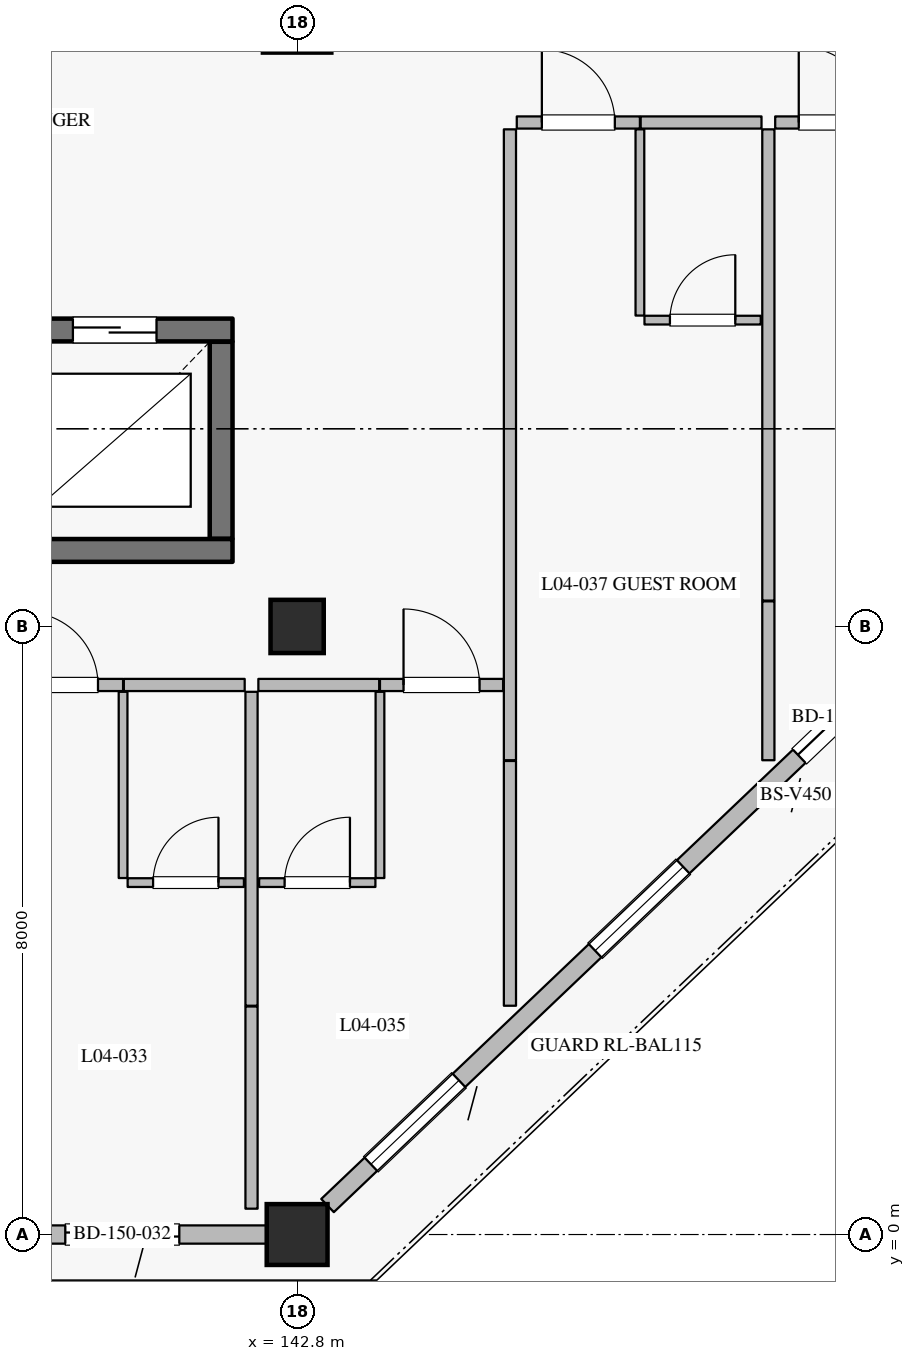
"""IFC4 building model, lengths in metres.
Left out: names, types, materials, properties, quantities, classifications, styles, units other than length and angle.
Written with IfcOpenShell. Run it as: python <this file> out.ifc"""

import sys

from ifc_helpers import new_model, si_unit, direction, frame, frame_2d, origin, origin_2d, place, context, subcontext, project, spatial, rectangle, extrude, element, fill, save


model = new_model("IFC4")
c1 = context("Model", 3, precision=1e-05, world=origin(), true_north=direction((0.0, 1.0)))
c2 = subcontext(c1, "Body", "Model", "MODEL_VIEW")
j1 = project(units=[si_unit("LENGTHUNIT", "METRE"), si_unit("PLANEANGLEUNIT", "RADIAN")], contexts=[c1])
p1 = place(None, origin())
s1 = spatial("IfcSite", under=j1, at=p1, CompositionType="ELEMENT")
p2 = place(p1, origin())
s2 = spatial("IfcBuilding", under=s1, at=p2, CompositionType="ELEMENT")
p3 = place(p2, frame((0.0, 0.0, 21.0)))
s3 = spatial("IfcBuildingStorey", under=s2, at=p3, CompositionType="ELEMENT", Elevation=21.0)
p4 = place(p3, frame((142.8, 0.0, 0.0), z_axis=(0.0, 0.0, 1.0), x_axis=(1.0, 0.0, 0.0)))
e1 = element("IfcColumn", 1, at=p4, inside=s3, PredefinedType="COLUMN", context=c2, shape_type="SweptSolid", body=[
    extrude(rectangle(XDim=0.8, YDim=0.8, at=origin_2d()), origin(), (0.0, 0.0, 1.0), 4.2),
])
p5 = place(p3, frame((142.8, 8.0, 0.0), z_axis=(0.0, 0.0, 1.0), x_axis=(1.0, 0.0, 0.0)))
e2 = element("IfcColumn", 2, at=p5, inside=s3, PredefinedType="COLUMN", context=c2, shape_type="SweptSolid", body=[
    extrude(rectangle(XDim=0.7, YDim=0.7, at=origin_2d()), origin(), (0.0, 0.0, 1.0), 4.2),
])
p6 = place(p3, frame((142.4, 0.0, 0.0), z_axis=(0.0, 0.0, 1.0), x_axis=(-1.0, 0.0, 0.0)))
e3 = element("IfcWall", 3, at=p6, inside=s3, PredefinedType="SOLIDWALL", context=c2, shape_type="SweptSolid", body=[
    extrude(rectangle(XDim=7.6, YDim=0.24, at=frame_2d((3.8, 0.0))), origin(), (0.0, 0.0, 1.0), 3.53),
])
p7 = place(p6, frame((1.15, 0.0, 0.0)))
e4 = element("IfcOpeningElement", 4, at=p7, cuts=e3, PredefinedType="OPENING", context=c2, shape_type="SweptSolid", body=[
    extrude(rectangle(XDim=1.5, YDim=2.25, at=frame_2d((0.75, 1.125))), frame((0.0, 0.13, 0.0), z_axis=(0.0, -1.0, 0.0), x_axis=(1.0, 0.0, 0.0)), (0.0, 0.0, 1.0), 0.26),
])
p8 = place(p6, frame((4.5, 0.0, 0.8)))
e5 = element("IfcOpeningElement", 5, at=p8, cuts=e3, PredefinedType="OPENING", context=c2, shape_type="SweptSolid", body=[
    extrude(rectangle(XDim=1.6, YDim=1.6, at=frame_2d((0.8, 0.8))), frame((0.0, 0.13, 0.0), z_axis=(0.0, -1.0, 0.0), x_axis=(1.0, 0.0, 0.0)), (0.0, 0.0, 1.0), 0.26),
])
p9 = place(p3, frame((150.8, 7.619, 0.0), z_axis=(0.0, 0.0, 1.0), x_axis=(-0.724156739794, -0.689635422677, 0.0)))
e6 = element("IfcWall", 6, at=p9, inside=s3, PredefinedType="SOLIDWALL", context=c2, shape_type="SweptSolid", body=[
    extrude(rectangle(XDim=10.495, YDim=0.24, at=frame_2d((5.248, 0.0))), origin(), (0.0, 0.0, 1.0), 3.53),
])
p10 = place(p9, frame((0.424, 0.0, 0.0)))
e7 = element("IfcOpeningElement", 7, at=p10, cuts=e6, PredefinedType="OPENING", context=c2, shape_type="SweptSolid", body=[
    extrude(rectangle(XDim=1.5, YDim=2.25, at=frame_2d((0.75, 1.125))), frame((0.0, 0.13, 0.0), z_axis=(0.0, -1.0, 0.0), x_axis=(1.0, 0.0, 0.0)), (0.0, 0.0, 1.0), 0.26),
])
p11 = place(p9, frame((4.033, 0.0, 0.8)))
e8 = element("IfcOpeningElement", 8, at=p11, cuts=e6, PredefinedType="OPENING", context=c2, shape_type="SweptSolid", body=[
    extrude(rectangle(XDim=1.6, YDim=1.6, at=frame_2d((0.8, 0.8))), frame((0.0, 0.13, 0.0), z_axis=(0.0, -1.0, 0.0), x_axis=(1.0, 0.0, 0.0)), (0.0, 0.0, 1.0), 0.26),
])
p12 = place(p9, frame((8.107, 0.0, 0.8)))
e9 = element("IfcOpeningElement", 9, at=p12, cuts=e6, PredefinedType="OPENING", context=c2, shape_type="SweptSolid", body=[
    extrude(rectangle(XDim=1.6, YDim=1.6, at=frame_2d((0.8, 0.8))), frame((0.0, 0.13, 0.0), z_axis=(0.0, -1.0, 0.0), x_axis=(1.0, 0.0, 0.0)), (0.0, 0.0, 1.0), 0.26),
])
p13 = place(p3, frame((138.85, 9.0, 0.0), z_axis=(0.0, 0.0, 1.0), x_axis=(1.0, 0.0, 0.0)))
e10 = element("IfcWall", 10, at=p13, inside=s3, PredefinedType="SHEAR", context=c2, shape_type="SweptSolid", body=[
    extrude(rectangle(XDim=3.1, YDim=0.3, at=frame_2d((1.55, 0.0))), origin(), (0.0, 0.0, 1.0), 3.965),
])
p14 = place(p3, frame((141.8, 9.155, 0.0), z_axis=(0.0, 0.0, 1.0), x_axis=(0.0, 1.0, 0.0)))
e11 = element("IfcWall", 11, at=p14, inside=s3, PredefinedType="SHEAR", context=c2, shape_type="SweptSolid", body=[
    extrude(rectangle(XDim=2.59, YDim=0.3, at=frame_2d((1.295, 0.0))), origin(), (0.0, 0.0, 1.0), 3.965),
])
p15 = place(p3, frame((141.95, 11.9, 0.0), z_axis=(0.0, 0.0, 1.0), x_axis=(-1.0, 0.0, 0.0)))
e12 = element("IfcWall", 12, at=p15, inside=s3, PredefinedType="SHEAR", context=c2, shape_type="SweptSolid", body=[
    extrude(rectangle(XDim=3.1, YDim=0.3, at=frame_2d((1.55, 0.0))), origin(), (0.0, 0.0, 1.0), 3.965),
])
p16 = place(p15, frame((1.0, 0.0, 0.0)))
e13 = element("IfcOpeningElement", 13, at=p16, cuts=e12, PredefinedType="OPENING", context=c2, shape_type="SweptSolid", body=[
    extrude(rectangle(XDim=1.1, YDim=2.2, at=frame_2d((0.55, 1.1))), frame((0.0, 0.16, 0.0), z_axis=(0.0, -1.0, 0.0), x_axis=(1.0, 0.0, 0.0)), (0.0, 0.0, 1.0), 0.32),
])
p17 = place(p3, frame((138.89, 7.23, 0.0), z_axis=(0.0, 0.0, 1.0), x_axis=(1.0, 0.0, 0.0)))
e14 = element("IfcWall", 14, at=p17, inside=s3, PredefinedType="PARTITIONING", context=c2, shape_type="SweptSolid", body=[
    extrude(rectangle(XDim=1.62, YDim=0.16, at=frame_2d((0.81, 0.0))), origin(), (0.0, 0.0, 1.0), 3.965),
])
p18 = place(p17, frame((0.33, 0.0, 0.0)))
e15 = element("IfcOpeningElement", 15, at=p18, cuts=e14, PredefinedType="OPENING", context=c2, shape_type="SweptSolid", body=[
    extrude(rectangle(XDim=0.96, YDim=2.2, at=frame_2d((0.48, 1.1))), frame((0.0, 0.09, 0.0), z_axis=(0.0, -1.0, 0.0), x_axis=(1.0, 0.0, 0.0)), (0.0, 0.0, 1.0), 0.18),
])
p19 = place(p3, frame((140.52, 7.23, 0.0), z_axis=(0.0, 0.0, 1.0), x_axis=(1.0, 0.0, 0.0)))
e16 = element("IfcWall", 16, at=p19, inside=s3, PredefinedType="PARTITIONING", context=c2, shape_type="SweptSolid", body=[
    extrude(rectangle(XDim=1.59, YDim=0.16, at=frame_2d((0.795, 0.0))), origin(), (0.0, 0.0, 1.0), 3.965),
])
p20 = place(p3, frame((140.51, 4.69, 0.0), z_axis=(0.0, 0.0, 1.0), x_axis=(0.0, 1.0, 0.0)))
e17 = element("IfcWall", 17, at=p20, inside=s3, PredefinedType="PARTITIONING", context=c2, shape_type="SweptSolid", body=[
    extrude(rectangle(XDim=2.45, YDim=0.115, at=frame_2d((1.225, 0.0))), origin(), (0.0, 0.0, 1.0), 3.965),
])
p21 = place(p3, frame((140.57, 4.63, 0.0), z_axis=(0.0, 0.0, 1.0), x_axis=(1.0, 0.0, 0.0)))
e18 = element("IfcWall", 18, at=p21, inside=s3, PredefinedType="PARTITIONING", context=c2, shape_type="SweptSolid", body=[
    extrude(rectangle(XDim=1.53, YDim=0.115, at=frame_2d((0.765, 0.0))), origin(), (0.0, 0.0, 1.0), 3.965),
])
p22 = place(p21, frame((0.335, 0.0, 0.0)))
e19 = element("IfcOpeningElement", 19, at=p22, cuts=e18, PredefinedType="OPENING", context=c2, shape_type="SweptSolid", body=[
    extrude(rectangle(XDim=0.86, YDim=2.12, at=frame_2d((0.43, 1.06))), frame((0.0, 0.067, 0.0), z_axis=(0.0, -1.0, 0.0), x_axis=(1.0, 0.0, 0.0)), (0.0, 0.0, 1.0), 0.135),
])
p23 = place(p3, frame((142.2, 0.34, 0.0), z_axis=(0.0, 0.0, 1.0), x_axis=(0.0, 1.0, 0.0)))
e20 = element("IfcWall", 20, at=p23, inside=s3, PredefinedType="PARTITIONING", context=c2, shape_type="SweptSolid", body=[
    extrude(rectangle(XDim=2.66, YDim=0.16, at=frame_2d((1.33, 0.0))), origin(), (0.0, 0.0, 1.0), 3.965),
])
p24 = place(p3, frame((142.29, 7.23, 0.0), z_axis=(0.0, 0.0, 1.0), x_axis=(1.0, 0.0, 0.0)))
e21 = element("IfcWall", 21, at=p24, inside=s3, PredefinedType="PARTITIONING", context=c2, shape_type="SweptSolid", body=[
    extrude(rectangle(XDim=1.59, YDim=0.16, at=frame_2d((0.795, 0.0))), origin(), (0.0, 0.0, 1.0), 3.965),
])
p25 = place(p3, frame((143.89, 7.23, 0.0), z_axis=(0.0, 0.0, 1.0), x_axis=(1.0, 0.0, 0.0)))
e22 = element("IfcWall", 22, at=p25, inside=s3, PredefinedType="PARTITIONING", context=c2, shape_type="SweptSolid", body=[
    extrude(rectangle(XDim=1.62, YDim=0.16, at=frame_2d((0.81, 0.0))), origin(), (0.0, 0.0, 1.0), 3.965),
])
p26 = place(p25, frame((0.31, 0.0, 0.0)))
e23 = element("IfcOpeningElement", 23, at=p26, cuts=e22, PredefinedType="OPENING", context=c2, shape_type="SweptSolid", body=[
    extrude(rectangle(XDim=1.0, YDim=2.25, at=frame_2d((0.5, 1.125))), frame((0.0, 0.09, 0.0), z_axis=(0.0, -1.0, 0.0), x_axis=(1.0, 0.0, 0.0)), (0.0, 0.0, 1.0), 0.18),
])
p27 = place(p3, frame((143.89, 4.69, 0.0), z_axis=(0.0, 0.0, 1.0), x_axis=(0.0, 1.0, 0.0)))
e24 = element("IfcWall", 24, at=p27, inside=s3, PredefinedType="PARTITIONING", context=c2, shape_type="SweptSolid", body=[
    extrude(rectangle(XDim=2.45, YDim=0.115, at=frame_2d((1.225, 0.0))), origin(), (0.0, 0.0, 1.0), 3.965),
])
p28 = place(p3, frame((142.3, 4.63, 0.0), z_axis=(0.0, 0.0, 1.0), x_axis=(1.0, 0.0, 0.0)))
e25 = element("IfcWall", 25, at=p28, inside=s3, PredefinedType="PARTITIONING", context=c2, shape_type="SweptSolid", body=[
    extrude(rectangle(XDim=1.53, YDim=0.115, at=frame_2d((0.765, 0.0))), origin(), (0.0, 0.0, 1.0), 3.965),
])
p29 = place(p28, frame((0.335, 0.0, 0.0)))
e26 = element("IfcOpeningElement", 26, at=p29, cuts=e25, PredefinedType="OPENING", context=c2, shape_type="SweptSolid", body=[
    extrude(rectangle(XDim=0.86, YDim=2.12, at=frame_2d((0.43, 1.06))), frame((0.0, 0.067, 0.0), z_axis=(0.0, -1.0, 0.0), x_axis=(1.0, 0.0, 0.0)), (0.0, 0.0, 1.0), 0.135),
])
p30 = place(p3, frame((142.2, 3.01, 0.0), z_axis=(0.0, 0.0, 1.0), x_axis=(0.0, 1.0, 0.0)))
e27 = element("IfcWall", 27, at=p30, inside=s3, PredefinedType="PARTITIONING", context=c2, shape_type="SweptSolid", body=[
    extrude(rectangle(XDim=4.13, YDim=0.16, at=frame_2d((2.065, 0.0))), origin(), (0.0, 0.0, 1.0), 3.965),
])
p31 = place(p3, frame((145.6, 3.01, 0.0), z_axis=(0.0, 0.0, 1.0), x_axis=(0.0, 1.0, 0.0)))
e28 = element("IfcWall", 28, at=p31, inside=s3, PredefinedType="PARTITIONING", context=c2, shape_type="SweptSolid", body=[
    extrude(rectangle(XDim=3.22, YDim=0.16, at=frame_2d((1.61, 0.0))), origin(), (0.0, 0.0, 1.0), 3.965),
])
p32 = place(p3, frame((145.69, 14.63, 0.0), z_axis=(0.0, 0.0, 1.0), x_axis=(1.0, 0.0, 0.0)))
e29 = element("IfcWall", 29, at=p32, inside=s3, PredefinedType="PARTITIONING", context=c2, shape_type="SweptSolid", body=[
    extrude(rectangle(XDim=1.62, YDim=0.16, at=frame_2d((0.81, 0.0))), origin(), (0.0, 0.0, 1.0), 3.965),
])
p33 = place(p32, frame((0.33, 0.0, 0.0)))
e30 = element("IfcOpeningElement", 30, at=p33, cuts=e29, PredefinedType="OPENING", context=c2, shape_type="SweptSolid", body=[
    extrude(rectangle(XDim=0.96, YDim=2.2, at=frame_2d((0.48, 1.1))), frame((0.0, 0.09, 0.0), z_axis=(0.0, -1.0, 0.0), x_axis=(1.0, 0.0, 0.0)), (0.0, 0.0, 1.0), 0.18),
])
p34 = place(p3, frame((147.32, 14.63, 0.0), z_axis=(0.0, 0.0, 1.0), x_axis=(1.0, 0.0, 0.0)))
e31 = element("IfcWall", 31, at=p34, inside=s3, PredefinedType="PARTITIONING", context=c2, shape_type="SweptSolid", body=[
    extrude(rectangle(XDim=1.59, YDim=0.16, at=frame_2d((0.795, 0.0))), origin(), (0.0, 0.0, 1.0), 3.965),
])
p35 = place(p3, frame((147.31, 12.09, 0.0), z_axis=(0.0, 0.0, 1.0), x_axis=(0.0, 1.0, 0.0)))
e32 = element("IfcWall", 32, at=p35, inside=s3, PredefinedType="PARTITIONING", context=c2, shape_type="SweptSolid", body=[
    extrude(rectangle(XDim=2.45, YDim=0.115, at=frame_2d((1.225, 0.0))), origin(), (0.0, 0.0, 1.0), 3.965),
])
p36 = place(p3, frame((147.37, 12.03, 0.0), z_axis=(0.0, 0.0, 1.0), x_axis=(1.0, 0.0, 0.0)))
e33 = element("IfcWall", 33, at=p36, inside=s3, PredefinedType="PARTITIONING", context=c2, shape_type="SweptSolid", body=[
    extrude(rectangle(XDim=1.53, YDim=0.115, at=frame_2d((0.765, 0.0))), origin(), (0.0, 0.0, 1.0), 3.965),
])
p37 = place(p36, frame((0.335, 0.0, 0.0)))
e34 = element("IfcOpeningElement", 34, at=p37, cuts=e33, PredefinedType="OPENING", context=c2, shape_type="SweptSolid", body=[
    extrude(rectangle(XDim=0.86, YDim=2.12, at=frame_2d((0.43, 1.06))), frame((0.0, 0.067, 0.0), z_axis=(0.0, -1.0, 0.0), x_axis=(1.0, 0.0, 0.0)), (0.0, 0.0, 1.0), 0.135),
])
p38 = place(p3, frame((145.6, 6.24, 0.0), z_axis=(0.0, 0.0, 1.0), x_axis=(0.0, 1.0, 0.0)))
e35 = element("IfcWall", 35, at=p38, inside=s3, PredefinedType="PARTITIONING", context=c2, shape_type="SweptSolid", body=[
    extrude(rectangle(XDim=8.3, YDim=0.16, at=frame_2d((4.15, 0.0))), origin(), (0.0, 0.0, 1.0), 3.965),
])
p39 = place(p3, frame((149.0, 6.24, 0.0), z_axis=(0.0, 0.0, 1.0), x_axis=(0.0, 1.0, 0.0)))
e36 = element("IfcWall", 36, at=p39, inside=s3, PredefinedType="PARTITIONING", context=c2, shape_type="SweptSolid", body=[
    extrude(rectangle(XDim=2.09, YDim=0.16, at=frame_2d((1.045, 0.0))), origin(), (0.0, 0.0, 1.0), 3.965),
])
p40 = place(p3, frame((149.09, 14.63, 0.0), z_axis=(0.0, 0.0, 1.0), x_axis=(1.0, 0.0, 0.0)))
e37 = element("IfcWall", 37, at=p40, inside=s3, PredefinedType="PARTITIONING", context=c2, shape_type="SweptSolid", body=[
    extrude(rectangle(XDim=1.62, YDim=0.16, at=frame_2d((0.81, 0.0))), origin(), (0.0, 0.0, 1.0), 3.965),
])
p41 = place(p40, frame((0.31, 0.0, 0.0)))
e38 = element("IfcOpeningElement", 38, at=p41, cuts=e37, PredefinedType="OPENING", context=c2, shape_type="SweptSolid", body=[
    extrude(rectangle(XDim=1.0, YDim=2.25, at=frame_2d((0.5, 1.125))), frame((0.0, 0.09, 0.0), z_axis=(0.0, -1.0, 0.0), x_axis=(1.0, 0.0, 0.0)), (0.0, 0.0, 1.0), 0.18),
])
p42 = place(p3, frame((149.0, 8.34, 0.0), z_axis=(0.0, 0.0, 1.0), x_axis=(0.0, 1.0, 0.0)))
e39 = element("IfcWall", 39, at=p42, inside=s3, PredefinedType="PARTITIONING", context=c2, shape_type="SweptSolid", body=[
    extrude(rectangle(XDim=6.2, YDim=0.16, at=frame_2d((3.1, 0.0))), origin(), (0.0, 0.0, 1.0), 3.965),
])
p43 = place(p7, origin())
e40 = element("IfcDoor", 40, at=p43, inside=s3, OperationType="SLIDING_TO_LEFT", PredefinedType="DOOR", context=c2, shape_type="SweptSolid", body=[
    extrude(rectangle(XDim=1.5, YDim=2.25, at=frame_2d((0.75, 1.125))), frame((0.0, 0.025, 0.0), z_axis=(0.0, -1.0, 0.0), x_axis=(1.0, 0.0, 0.0)), (0.0, 0.0, 1.0), 0.05),
])
fill(e4, e40)
p44 = place(p10, origin())
e41 = element("IfcDoor", 41, at=p44, inside=s3, OperationType="SLIDING_TO_LEFT", PredefinedType="DOOR", context=c2, shape_type="SweptSolid", body=[
    extrude(rectangle(XDim=1.5, YDim=2.25, at=frame_2d((0.75, 1.125))), frame((0.0, 0.025, 0.0), z_axis=(0.0, -1.0, 0.0), x_axis=(1.0, 0.0, 0.0)), (0.0, 0.0, 1.0), 0.05),
])
fill(e7, e41)
p45 = place(p11, origin())
e42 = element("IfcWindow", 42, at=p45, inside=s3, PartitioningType="SINGLE_PANEL", PredefinedType="WINDOW", context=c2, shape_type="SweptSolid", body=[
    extrude(rectangle(XDim=1.6, YDim=1.6, at=frame_2d((0.8, 0.8))), frame((0.0, 0.03, 0.0), z_axis=(0.0, -1.0, 0.0), x_axis=(1.0, 0.0, 0.0)), (0.0, 0.0, 1.0), 0.06),
])
fill(e8, e42)
p46 = place(p12, origin())
e43 = element("IfcWindow", 43, at=p46, inside=s3, PartitioningType="SINGLE_PANEL", PredefinedType="WINDOW", context=c2, shape_type="SweptSolid", body=[
    extrude(rectangle(XDim=1.6, YDim=1.6, at=frame_2d((0.8, 0.8))), frame((0.0, 0.03, 0.0), z_axis=(0.0, -1.0, 0.0), x_axis=(1.0, 0.0, 0.0)), (0.0, 0.0, 1.0), 0.06),
])
fill(e9, e43)
p47 = place(p16, origin())
e44 = element("IfcDoor", 44, at=p47, inside=s3, OperationType="DOUBLE_DOOR_SLIDING", PredefinedType="DOOR", context=c2, shape_type="SweptSolid", body=[
    extrude(rectangle(XDim=1.1, YDim=2.2, at=frame_2d((0.55, 1.1))), frame((0.0, 0.025, 0.0), z_axis=(0.0, -1.0, 0.0), x_axis=(1.0, 0.0, 0.0)), (0.0, 0.0, 1.0), 0.05),
])
fill(e13, e44)
p48 = place(p18, origin())
e45 = element("IfcDoor", 45, at=p48, inside=s3, OperationType="SINGLE_SWING_LEFT", PredefinedType="DOOR", context=c2, shape_type="SweptSolid", body=[
    extrude(rectangle(XDim=0.96, YDim=2.2, at=frame_2d((0.48, 1.1))), frame((0.0, 0.025, 0.0), z_axis=(0.0, -1.0, 0.0), x_axis=(1.0, 0.0, 0.0)), (0.0, 0.0, 1.0), 0.05),
])
fill(e15, e45)
p49 = place(p22, origin())
e46 = element("IfcDoor", 46, at=p49, inside=s3, OperationType="SINGLE_SWING_RIGHT", PredefinedType="DOOR", context=c2, shape_type="SweptSolid", body=[
    extrude(rectangle(XDim=0.86, YDim=2.12, at=frame_2d((0.43, 1.06))), frame((0.0, 0.025, 0.0), z_axis=(0.0, -1.0, 0.0), x_axis=(1.0, 0.0, 0.0)), (0.0, 0.0, 1.0), 0.05),
])
fill(e19, e46)
p50 = place(p26, origin())
e47 = element("IfcDoor", 47, at=p50, inside=s3, OperationType="SINGLE_SWING_LEFT", PredefinedType="DOOR", context=c2, shape_type="SweptSolid", body=[
    extrude(rectangle(XDim=1.0, YDim=2.25, at=frame_2d((0.5, 1.125))), frame((0.0, 0.025, 0.0), z_axis=(0.0, -1.0, 0.0), x_axis=(1.0, 0.0, 0.0)), (0.0, 0.0, 1.0), 0.05),
])
fill(e23, e47)
p51 = place(p29, origin())
e48 = element("IfcDoor", 48, at=p51, inside=s3, OperationType="SINGLE_SWING_RIGHT", PredefinedType="DOOR", context=c2, shape_type="SweptSolid", body=[
    extrude(rectangle(XDim=0.86, YDim=2.12, at=frame_2d((0.43, 1.06))), frame((0.0, 0.025, 0.0), z_axis=(0.0, -1.0, 0.0), x_axis=(1.0, 0.0, 0.0)), (0.0, 0.0, 1.0), 0.05),
])
fill(e26, e48)
p52 = place(p33, origin())
e49 = element("IfcDoor", 49, at=p52, inside=s3, OperationType="SINGLE_SWING_LEFT", PredefinedType="DOOR", context=c2, shape_type="SweptSolid", body=[
    extrude(rectangle(XDim=0.96, YDim=2.2, at=frame_2d((0.48, 1.1))), frame((0.0, 0.025, 0.0), z_axis=(0.0, -1.0, 0.0), x_axis=(1.0, 0.0, 0.0)), (0.0, 0.0, 1.0), 0.05),
])
fill(e30, e49)
p53 = place(p37, origin())
e50 = element("IfcDoor", 50, at=p53, inside=s3, OperationType="SINGLE_SWING_RIGHT", PredefinedType="DOOR", context=c2, shape_type="SweptSolid", body=[
    extrude(rectangle(XDim=0.86, YDim=2.12, at=frame_2d((0.43, 1.06))), frame((0.0, 0.025, 0.0), z_axis=(0.0, -1.0, 0.0), x_axis=(1.0, 0.0, 0.0)), (0.0, 0.0, 1.0), 0.05),
])
fill(e34, e50)
p54 = place(p41, origin())
e51 = element("IfcDoor", 51, at=p54, inside=s3, OperationType="SINGLE_SWING_LEFT", PredefinedType="DOOR", context=c2, shape_type="SweptSolid", body=[
    extrude(rectangle(XDim=1.0, YDim=2.25, at=frame_2d((0.5, 1.125))), frame((0.0, 0.025, 0.0), z_axis=(0.0, -1.0, 0.0), x_axis=(1.0, 0.0, 0.0)), (0.0, 0.0, 1.0), 0.05),
])
fill(e38, e51)
save(model, sys.argv[1])
